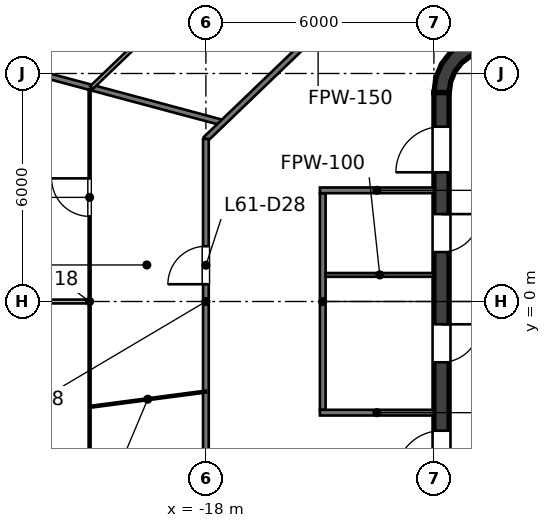
"""IFC4 building model, lengths in metres.
Left out: names, types, materials, properties, quantities, classifications, styles, units other than length and angle.
Written with IfcOpenShell. Run it as: python <this file> out.ifc"""

import sys

from ifc_helpers import new_model, si_unit, direction, frame, frame_2d, origin, place, context, subcontext, project, spatial, polyline, rectangle, outline, extrude, element, fill, save


model = new_model("IFC4")
c1 = context("Model", 3, precision=1e-05, world=origin(), true_north=direction((0.0, 1.0)))
c2 = subcontext(c1, "Body", "Model", "MODEL_VIEW")
j1 = project(units=[si_unit("LENGTHUNIT", "METRE"), si_unit("PLANEANGLEUNIT", "RADIAN")], contexts=[c1])
p1 = place(None, origin())
s1 = spatial("IfcSite", under=j1, at=p1, CompositionType="ELEMENT")
p2 = place(p1, origin())
s2 = spatial("IfcBuilding", under=s1, at=p2, CompositionType="ELEMENT")
p3 = place(p2, frame((0.0, 0.0, 279.0)))
s3 = spatial("IfcBuildingStorey", under=s2, at=p3, CompositionType="ELEMENT", Elevation=279.0)
p4 = place(p3, frame((-11.8, -5.5, 0.0), z_axis=(0.0, 0.0, 1.0), x_axis=(0.0, 1.0, 0.0)))
e1 = element("IfcWall", 1, at=p4, inside=s3, PredefinedType="SHEAR", context=c2, shape_type="SweptSolid", body=[
    extrude(rectangle(XDim=11.0, YDim=0.4, at=frame_2d((5.5, 0.0))), origin(), (0.0, 0.0, 1.0), 4.0),
])
p5 = place(p4, frame((3.9, 0.0, 0.0)))
e2 = element("IfcOpeningElement", 2, at=p5, cuts=e1, PredefinedType="OPENING", context=c2, shape_type="SweptSolid", body=[
    extrude(rectangle(XDim=1.0, YDim=2.1, at=frame_2d((0.5, 1.05))), frame((0.0, 0.2, 0.0), z_axis=(0.0, -1.0, 0.0), x_axis=(1.0, 0.0, 0.0)), (0.0, 0.0, 1.0), 0.4),
])
p6 = place(p4, frame((6.8, 0.0, 0.0)))
e3 = element("IfcOpeningElement", 3, at=p6, cuts=e1, PredefinedType="OPENING", context=c2, shape_type="SweptSolid", body=[
    extrude(rectangle(XDim=1.0, YDim=2.1, at=frame_2d((0.5, 1.05))), frame((0.0, 0.2, 0.0), z_axis=(0.0, -1.0, 0.0), x_axis=(1.0, 0.0, 0.0)), (0.0, 0.0, 1.0), 0.4),
])
p7 = place(p4, frame((0.9, 0.0, 0.0)))
e4 = element("IfcOpeningElement", 4, at=p7, cuts=e1, PredefinedType="OPENING", context=c2, shape_type="SweptSolid", body=[
    extrude(rectangle(XDim=1.2, YDim=2.1, at=frame_2d((0.6, 1.05))), frame((0.0, 0.2, 0.0), z_axis=(0.0, -1.0, 0.0), x_axis=(1.0, 0.0, 0.0)), (0.0, 0.0, 1.0), 0.4),
])
p8 = place(p4, frame((8.9, 0.0, 0.0)))
e5 = element("IfcOpeningElement", 5, at=p8, cuts=e1, PredefinedType="OPENING", context=c2, shape_type="SweptSolid", body=[
    extrude(rectangle(XDim=1.2, YDim=2.1, at=frame_2d((0.6, 1.05))), frame((0.0, 0.2, 0.0), z_axis=(0.0, -1.0, 0.0), x_axis=(1.0, 0.0, 0.0)), (0.0, 0.0, 1.0), 0.4),
])
p9 = place(p3, origin())
e6 = element("IfcWall", 6, at=p9, inside=s3, PredefinedType="SHEAR", context=c2, shape_type="SweptSolid", body=[
    extrude(outline(polyline([(-12.0, 5.5), (-11.596, 5.5), (-11.559, 5.784), (-11.45, 6.048), (-11.275, 6.275), (-11.048, 6.45), (-10.784, 6.559), (-10.5, 6.596), (-10.5, 7.0), (-10.888, 6.949), (-11.25, 6.799), (-11.561, 6.561), (-11.799, 6.25), (-11.949, 5.888), (-12.0, 5.5)])), origin(), (0.0, 0.0, 1.0), 4.0),
])
p10 = place(p3, frame((-14.925, -2.85, 0.0), z_axis=(0.0, 0.0, 1.0), x_axis=(0.0, 1.0, 0.0)))
e7 = element("IfcWall", 7, at=p10, inside=s3, PredefinedType="PARTITIONING", context=c2, shape_type="SweptSolid", body=[
    extrude(rectangle(XDim=5.7, YDim=0.15, at=frame_2d((2.85, 0.0))), origin(), (0.0, 0.0, 1.0), 2.918),
])
for number, where, z_axis, x_axis in (
    (8, (-15.0, 2.925, 0.0), (0.0, 0.0, 1.0), (1.0, 0.0, 0.0)),
    (9, (-15.0, -2.925, 0.0), (0.0, 0.0, 1.0), (1.0, 0.0, 0.0)),
):
    element("IfcWall", number, at=place(p3, frame(where, z_axis=z_axis, x_axis=x_axis)), inside=s3, PredefinedType="PARTITIONING", context=c2, shape_type="SweptSolid", body=[
        extrude(rectangle(XDim=3.0, YDim=0.15, at=frame_2d((1.5, 0.0))), origin(), (0.0, 0.0, 1.0), 3.85),
    ])
p11 = place(p3, frame((-14.85, 0.7, 0.0), z_axis=(0.0, 0.0, 1.0), x_axis=(1.0, 0.0, 0.0)))
e10 = element("IfcWall", 10, at=p11, inside=s3, PredefinedType="PARTITIONING", context=c2, shape_type="SweptSolid", body=[
    extrude(rectangle(XDim=2.85, YDim=0.1, at=frame_2d((1.425, 0.0))), origin(), (0.0, 0.0, 1.0), 3.85),
])
p12 = place(p3, frame((-27.759, 7.438, 0.0), z_axis=(0.0, 0.0, 1.0), x_axis=(0.965913486924, -0.258865091851, 0.0)))
e11 = element("IfcWall", 11, at=p12, inside=s3, PredefinedType="PARTITIONING", context=c2, shape_type="SweptSolid", body=[
    extrude(rectangle(XDim=10.563, YDim=0.15, at=frame_2d((5.281, 0.0))), origin(), (0.0, 0.0, 1.0), 2.927),
])
p13 = place(p3, frame((-18.0, 4.278, 0.0), z_axis=(0.0, 0.0, 1.0), x_axis=(0.72131938425, 0.692602588722, 0.0)))
e12 = element("IfcWall", 12, at=p13, inside=s3, PredefinedType="PARTITIONING", context=c2, shape_type="SweptSolid", body=[
    extrude(rectangle(XDim=8.187, YDim=0.15, at=frame_2d((4.094, 0.0))), origin(), (0.0, 0.0, 1.0), 2.927),
])
p14 = place(p3, frame((-18.0, -4.278, 0.0), z_axis=(0.0, 0.0, 1.0), x_axis=(0.0, 1.0, 0.0)))
e13 = element("IfcWall", 13, at=p14, inside=s3, PredefinedType="PARTITIONING", context=c2, shape_type="SweptSolid", body=[
    extrude(rectangle(XDim=8.556, YDim=0.15, at=frame_2d((4.278, 0.0))), origin(), (0.0, 0.0, 1.0), 2.918),
])
p15 = place(p14, frame((4.732, 0.0, 0.0)))
e14 = element("IfcOpeningElement", 14, at=p15, cuts=e13, PredefinedType="OPENING", context=c2, shape_type="SweptSolid", body=[
    extrude(rectangle(XDim=1.0, YDim=2.1, at=frame_2d((0.5, 1.05))), frame((0.0, 0.075, 0.0), z_axis=(0.0, -1.0, 0.0), x_axis=(1.0, 0.0, 0.0)), (0.0, 0.0, 1.0), 0.15),
])
p16 = place(p3, frame((-21.06, -2.773, 0.0), z_axis=(0.0, 0.0, 1.0), x_axis=(0.991446216664, 0.130515897359, 0.0)))
e15 = element("IfcWall", 15, at=p16, inside=s3, PredefinedType="PARTITIONING", context=c2, shape_type="SweptSolid", body=[
    extrude(rectangle(XDim=3.086, YDim=0.05, at=frame_2d((1.543, 0.0))), origin(), (0.0, 0.0, 1.0), 3.85),
])
p17 = place(p3, frame((-21.06, -5.582, 0.0), z_axis=(0.0, 0.0, 1.0), x_axis=(0.0, 1.0, 0.0)))
e16 = element("IfcWall", 16, at=p17, inside=s3, PredefinedType="PARTITIONING", context=c2, shape_type="SweptSolid", body=[
    extrude(rectangle(XDim=11.164, YDim=0.05, at=frame_2d((5.582, 0.0))), origin(), (0.0, 0.0, 1.0), 2.918),
])
p18 = place(p17, frame((7.822, 0.0, 0.0)))
e17 = element("IfcOpeningElement", 17, at=p18, cuts=e16, PredefinedType="OPENING", context=c2, shape_type="SweptSolid", body=[
    extrude(rectangle(XDim=1.0, YDim=2.1, at=frame_2d((0.5, 1.05))), frame((0.0, 0.025, 0.0), z_axis=(0.0, -1.0, 0.0), x_axis=(1.0, 0.0, 0.0)), (0.0, 0.0, 1.0), 0.05),
])
p19 = place(p3, frame((-29.234, 0.0, 0.0), z_axis=(0.0, 0.0, 1.0), x_axis=(1.0, 0.0, 0.0)))
e18 = element("IfcWall", 18, at=p19, inside=s3, PredefinedType="PARTITIONING", context=c2, shape_type="SweptSolid", body=[
    extrude(rectangle(XDim=8.174, YDim=0.1, at=frame_2d((4.087, 0.0))), origin(), (0.0, 0.0, 1.0), 2.918),
])
p20 = place(p3, frame((-21.01, 5.63, 0.0), z_axis=(0.0, 0.0, 1.0), x_axis=(0.721217397593, 0.692708788315, 0.0)))
e19 = element("IfcWall", 19, at=p20, inside=s3, PredefinedType="PARTITIONING", context=c2, shape_type="SweptSolid", body=[
    extrude(rectangle(XDim=10.653, YDim=0.1, at=frame_2d((5.327, 0.0))), origin(), (0.0, 0.0, 1.0), 2.927),
])
p21 = place(p5, origin())
e20 = element("IfcDoor", 20, at=p21, inside=s3, OperationType="SINGLE_SWING_RIGHT", PredefinedType="DOOR", context=c2, shape_type="SweptSolid", body=[
    extrude(rectangle(XDim=1.0, YDim=2.1, at=frame_2d((0.5, 1.05))), frame((0.0, 0.025, 0.0), z_axis=(0.0, -1.0, 0.0), x_axis=(1.0, 0.0, 0.0)), (0.0, 0.0, 1.0), 0.05),
])
fill(e2, e20)
p22 = place(p6, origin())
e21 = element("IfcDoor", 21, at=p22, inside=s3, OperationType="SINGLE_SWING_RIGHT", PredefinedType="DOOR", context=c2, shape_type="SweptSolid", body=[
    extrude(rectangle(XDim=1.0, YDim=2.1, at=frame_2d((0.5, 1.05))), frame((0.0, 0.025, 0.0), z_axis=(0.0, -1.0, 0.0), x_axis=(1.0, 0.0, 0.0)), (0.0, 0.0, 1.0), 0.05),
])
fill(e3, e21)
p23 = place(p7, origin())
e22 = element("IfcDoor", 22, at=p23, inside=s3, OperationType="SINGLE_SWING_LEFT", PredefinedType="DOOR", context=c2, shape_type="SweptSolid", body=[
    extrude(rectangle(XDim=1.2, YDim=2.1, at=frame_2d((0.6, 1.05))), frame((0.0, 0.025, 0.0), z_axis=(0.0, -1.0, 0.0), x_axis=(1.0, 0.0, 0.0)), (0.0, 0.0, 1.0), 0.05),
])
fill(e4, e22)
p24 = place(p8, origin())
e23 = element("IfcDoor", 23, at=p24, inside=s3, OperationType="SINGLE_SWING_LEFT", PredefinedType="DOOR", context=c2, shape_type="SweptSolid", body=[
    extrude(rectangle(XDim=1.2, YDim=2.1, at=frame_2d((0.6, 1.05))), frame((0.0, 0.025, 0.0), z_axis=(0.0, -1.0, 0.0), x_axis=(1.0, 0.0, 0.0)), (0.0, 0.0, 1.0), 0.05),
])
fill(e5, e23)
p25 = place(p15, origin())
e24 = element("IfcDoor", 24, at=p25, inside=s3, OperationType="SINGLE_SWING_LEFT", PredefinedType="DOOR", context=c2, shape_type="SweptSolid", body=[
    extrude(rectangle(XDim=1.0, YDim=2.1, at=frame_2d((0.5, 1.05))), frame((0.0, 0.025, 0.0), z_axis=(0.0, -1.0, 0.0), x_axis=(1.0, 0.0, 0.0)), (0.0, 0.0, 1.0), 0.05),
])
fill(e14, e24)
p26 = place(p18, origin())
e25 = element("IfcDoor", 25, at=p26, inside=s3, OperationType="SINGLE_SWING_RIGHT", PredefinedType="DOOR", context=c2, shape_type="SweptSolid", body=[
    extrude(rectangle(XDim=1.0, YDim=2.1, at=frame_2d((0.5, 1.05))), frame((0.0, 0.025, 0.0), z_axis=(0.0, -1.0, 0.0), x_axis=(1.0, 0.0, 0.0)), (0.0, 0.0, 1.0), 0.05),
])
fill(e17, e25)
save(model, sys.argv[1])
